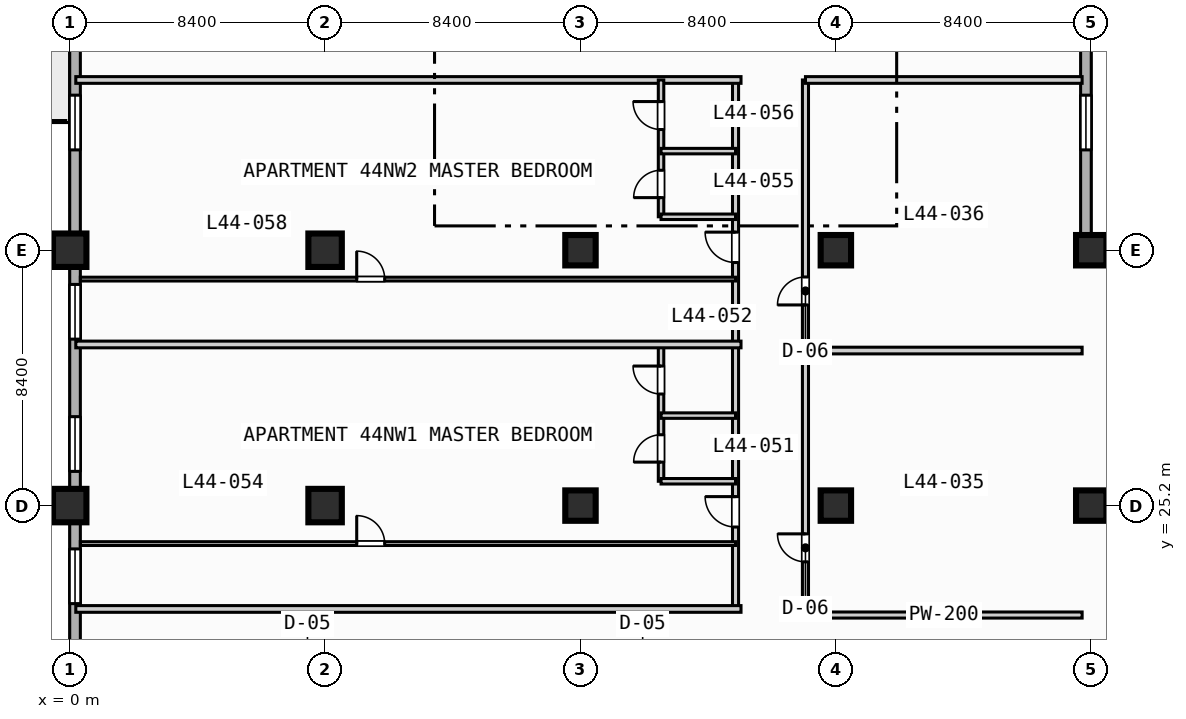
"""IFC4 building model, lengths in metres.
Left out: names, types, materials, properties, quantities, classifications, styles, units other than length and angle.
Written with IfcOpenShell. Run it as: python <this file> out.ifc"""

import sys

from ifc_helpers import new_model, si_unit, direction, frame, frame_2d, origin, origin_2d, place, context, subcontext, project, spatial, rectangle, extrude, element, fill, save


model = new_model("IFC4")
c1 = context("Model", 3, precision=1e-05, world=origin(), true_north=direction((0.0, 1.0)))
c2 = subcontext(c1, "Body", "Model", "MODEL_VIEW")
j1 = project(units=[si_unit("LENGTHUNIT", "METRE"), si_unit("PLANEANGLEUNIT", "RADIAN")], contexts=[c1])
p1 = place(None, origin())
s1 = spatial("IfcSite", under=j1, at=p1, CompositionType="ELEMENT")
p2 = place(p1, origin())
s2 = spatial("IfcBuilding", under=s1, at=p2, CompositionType="ELEMENT")
p3 = place(p2, frame((0.0, 0.0, 182.8)))
s3 = spatial("IfcBuildingStorey", under=s2, at=p3, CompositionType="ELEMENT", Elevation=182.8)
for number, where, z_axis, x_axis in (
    (1, (0.0, 25.2, 0.0), (0.0, 0.0, 1.0), (1.0, 0.0, 0.0)),
    (2, (0.0, 33.6, 0.0), (0.0, 0.0, 1.0), (1.0, 0.0, 0.0)),
    (3, (8.4, 25.2, 0.0), (0.0, 0.0, 1.0), (1.0, 0.0, 0.0)),
    (4, (8.4, 33.6, 0.0), (0.0, 0.0, 1.0), (1.0, 0.0, 0.0)),
):
    element("IfcColumn", number, at=place(p3, frame(where, z_axis=z_axis, x_axis=x_axis)), inside=s3, PredefinedType="COLUMN", context=c2, shape_type="SweptSolid", body=[
        extrude(rectangle(XDim=1.1, YDim=1.1, at=origin_2d()), origin(), (0.0, 0.0, 1.0), 3.7),
    ])
for number, where, z_axis, x_axis in (
    (5, (16.8, 25.2, 0.0), (0.0, 0.0, 1.0), (1.0, 0.0, 0.0)),
    (6, (16.8, 33.6, 0.0), (0.0, 0.0, 1.0), (1.0, 0.0, 0.0)),
    (7, (25.2, 25.2, 0.0), (0.0, 0.0, 1.0), (1.0, 0.0, 0.0)),
    (8, (25.2, 33.6, 0.0), (0.0, 0.0, 1.0), (1.0, 0.0, 0.0)),
    (9, (33.6, 25.2, 0.0), (0.0, 0.0, 1.0), (1.0, 0.0, 0.0)),
    (10, (33.6, 33.6, 0.0), (0.0, 0.0, 1.0), (1.0, 0.0, 0.0)),
):
    element("IfcColumn", number, at=place(p3, frame(where, z_axis=z_axis, x_axis=x_axis)), inside=s3, PredefinedType="COLUMN", context=c2, shape_type="SweptSolid", body=[
        extrude(rectangle(XDim=1.0, YDim=1.0, at=origin_2d()), origin(), (0.0, 0.0, 1.0), 3.7),
    ])
p4 = place(p3, frame((0.175, 3.175, 0.0), z_axis=(0.0, 0.0, 1.0), x_axis=(0.0, 1.0, 0.0)))
e11 = element("IfcWall", 11, at=p4, inside=s3, PredefinedType="STANDARD", context=c2, shape_type="SweptSolid", body=[
    extrude(rectangle(XDim=69.25, YDim=0.35, at=frame_2d((34.625, 0.0))), origin(), (0.0, 0.0, 1.0), 3.47),
])
p5 = place(p4, frame((42.325, 0.0, 0.0)))
e12 = element("IfcOpeningElement", 12, at=p5, cuts=e11, PredefinedType="OPENING", context=c2, shape_type="SweptSolid", body=[
    extrude(rectangle(XDim=1.4, YDim=2.2, at=frame_2d((0.7, 1.1))), frame((0.0, 0.185, 0.0), z_axis=(0.0, -1.0, 0.0), x_axis=(1.0, 0.0, 0.0)), (0.0, 0.0, 1.0), 0.37),
])
p6 = place(p4, frame((33.725, 0.0, 0.85)))
e13 = element("IfcOpeningElement", 13, at=p6, cuts=e11, PredefinedType="OPENING", context=c2, shape_type="SweptSolid", body=[
    extrude(rectangle(XDim=1.8, YDim=1.8, at=frame_2d((0.9, 0.9))), frame((0.0, 0.185, 0.0), z_axis=(0.0, -1.0, 0.0), x_axis=(1.0, 0.0, 0.0)), (0.0, 0.0, 1.0), 0.37),
])
p7 = place(p4, frame((18.8, 0.0, 0.85)))
e14 = element("IfcOpeningElement", 14, at=p7, cuts=e11, PredefinedType="OPENING", context=c2, shape_type="SweptSolid", body=[
    extrude(rectangle(XDim=1.8, YDim=1.8, at=frame_2d((0.9, 0.9))), frame((0.0, 0.185, 0.0), z_axis=(0.0, -1.0, 0.0), x_axis=(1.0, 0.0, 0.0)), (0.0, 0.0, 1.0), 0.37),
])
p8 = place(p4, frame((23.15, 0.0, 0.85)))
e15 = element("IfcOpeningElement", 15, at=p8, cuts=e11, PredefinedType="OPENING", context=c2, shape_type="SweptSolid", body=[
    extrude(rectangle(XDim=1.8, YDim=1.8, at=frame_2d((0.9, 0.9))), frame((0.0, 0.185, 0.0), z_axis=(0.0, -1.0, 0.0), x_axis=(1.0, 0.0, 0.0)), (0.0, 0.0, 1.0), 0.37),
])
p9 = place(p4, frame((27.5, 0.0, 0.85)))
e16 = element("IfcOpeningElement", 16, at=p9, cuts=e11, PredefinedType="OPENING", context=c2, shape_type="SweptSolid", body=[
    extrude(rectangle(XDim=1.8, YDim=1.8, at=frame_2d((0.9, 0.9))), frame((0.0, 0.185, 0.0), z_axis=(0.0, -1.0, 0.0), x_axis=(1.0, 0.0, 0.0)), (0.0, 0.0, 1.0), 0.37),
])
p10 = place(p3, frame((33.425, 72.425, 0.0), z_axis=(0.0, 0.0, 1.0), x_axis=(0.0, -1.0, 0.0)))
e17 = element("IfcWall", 17, at=p10, inside=s3, PredefinedType="STANDARD", context=c2, shape_type="SweptSolid", body=[
    extrude(rectangle(XDim=39.0, YDim=0.35, at=frame_2d((19.5, 0.0))), origin(), (0.0, 0.0, 1.0), 3.47),
])
p11 = place(p10, frame((33.725, 0.0, 0.85)))
e18 = element("IfcOpeningElement", 18, at=p11, cuts=e17, PredefinedType="OPENING", context=c2, shape_type="SweptSolid", body=[
    extrude(rectangle(XDim=1.8, YDim=1.8, at=frame_2d((0.9, 0.9))), frame((0.0, 0.185, 0.0), z_axis=(0.0, -1.0, 0.0), x_axis=(1.0, 0.0, 0.0)), (0.0, 0.0, 1.0), 0.37),
])
p12 = place(p10, frame((16.925, 0.0, 0.85)))
e19 = element("IfcOpeningElement", 19, at=p12, cuts=e17, PredefinedType="OPENING", context=c2, shape_type="SweptSolid", body=[
    extrude(rectangle(XDim=1.8, YDim=1.8, at=frame_2d((0.9, 0.9))), frame((0.0, 0.185, 0.0), z_axis=(0.0, -1.0, 0.0), x_axis=(1.0, 0.0, 0.0)), (0.0, 0.0, 1.0), 0.37),
])
p13 = place(p10, frame((8.225, 0.0, 0.85)))
e20 = element("IfcOpeningElement", 20, at=p13, cuts=e17, PredefinedType="OPENING", context=c2, shape_type="SweptSolid", body=[
    extrude(rectangle(XDim=2.4, YDim=1.95, at=frame_2d((1.2, 0.975))), frame((0.0, 0.185, 0.0), z_axis=(0.0, -1.0, 0.0), x_axis=(1.0, 0.0, 0.0)), (0.0, 0.0, 1.0), 0.37),
])
p14 = place(p3, frame((33.425, 33.425, 0.0), z_axis=(0.0, 0.0, 1.0), x_axis=(1.0, 0.0, 0.0)))
e21 = element("IfcWall", 21, at=p14, inside=s3, PredefinedType="STANDARD", context=c2, shape_type="SweptSolid", body=[
    extrude(rectangle(XDim=39.0, YDim=0.35, at=frame_2d((19.5, 0.0))), origin(), (0.0, 0.0, 1.0), 3.47),
])
p15 = place(p14, frame((12.075, 0.0, 0.0)))
e22 = element("IfcOpeningElement", 22, at=p15, cuts=e21, PredefinedType="OPENING", context=c2, shape_type="SweptSolid", body=[
    extrude(rectangle(XDim=1.4, YDim=2.2, at=frame_2d((0.7, 1.1))), frame((0.0, 0.185, 0.0), z_axis=(0.0, -1.0, 0.0), x_axis=(1.0, 0.0, 0.0)), (0.0, 0.0, 1.0), 0.37),
])
p16 = place(p14, frame((20.275, 0.0, 0.85)))
e23 = element("IfcOpeningElement", 23, at=p16, cuts=e21, PredefinedType="OPENING", context=c2, shape_type="SweptSolid", body=[
    extrude(rectangle(XDim=1.8, YDim=1.8, at=frame_2d((0.9, 0.9))), frame((0.0, 0.185, 0.0), z_axis=(0.0, -1.0, 0.0), x_axis=(1.0, 0.0, 0.0)), (0.0, 0.0, 1.0), 0.37),
])
p17 = place(p14, frame((28.375, 0.0, 0.85)))
e24 = element("IfcOpeningElement", 24, at=p17, cuts=e21, PredefinedType="OPENING", context=c2, shape_type="SweptSolid", body=[
    extrude(rectangle(XDim=2.4, YDim=1.95, at=frame_2d((1.2, 0.975))), frame((0.0, 0.185, 0.0), z_axis=(0.0, -1.0, 0.0), x_axis=(1.0, 0.0, 0.0)), (0.0, 0.0, 1.0), 0.37),
])
p18 = place(p3, frame((24.2, 21.6, 0.0), z_axis=(0.0, 0.0, 1.0), x_axis=(0.0, 1.0, 0.0)))
e25 = element("IfcWall", 25, at=p18, inside=s3, PredefinedType="PARTITIONING", context=c2, shape_type="SweptSolid", body=[
    extrude(rectangle(XDim=17.6, YDim=0.2, at=frame_2d((8.8, 0.0))), origin(), (0.0, 0.0, 1.0), 3.47),
])
p19 = place(p18, frame((1.75, 0.0, 0.0)))
e26 = element("IfcOpeningElement", 26, at=p19, cuts=e25, PredefinedType="OPENING", context=c2, shape_type="SweptSolid", body=[
    extrude(rectangle(XDim=0.92, YDim=2.1, at=frame_2d((0.46, 1.05))), frame((0.0, 0.11, 0.0), z_axis=(0.0, -1.0, 0.0), x_axis=(1.0, 0.0, 0.0)), (0.0, 0.0, 1.0), 0.22),
])
p20 = place(p18, frame((10.2, 0.0, 0.0)))
e27 = element("IfcOpeningElement", 27, at=p20, cuts=e25, PredefinedType="OPENING", context=c2, shape_type="SweptSolid", body=[
    extrude(rectangle(XDim=0.92, YDim=2.1, at=frame_2d((0.46, 1.05))), frame((0.0, 0.11, 0.0), z_axis=(0.0, -1.0, 0.0), x_axis=(1.0, 0.0, 0.0)), (0.0, 0.0, 1.0), 0.22),
])
p21 = place(p3, frame((24.2, 21.6, 0.0), z_axis=(0.0, 0.0, 1.0), x_axis=(1.0, 0.0, 0.0)))
e28 = element("IfcWall", 28, at=p21, inside=s3, PredefinedType="PARTITIONING", context=c2, shape_type="SweptSolid", body=[
    extrude(rectangle(XDim=9.1, YDim=0.2, at=frame_2d((4.55, 0.0))), origin(), (0.0, 0.0, 1.0), 3.47),
])
for number, where, z_axis, x_axis in (
    (29, (24.2, 30.3, 0.0), (0.0, 0.0, 1.0), (1.0, 0.0, 0.0)),
    (30, (24.2, 39.2, 0.0), (0.0, 0.0, 1.0), (1.0, 0.0, 0.0)),
):
    element("IfcWall", number, at=place(p3, frame(where, z_axis=z_axis, x_axis=x_axis)), inside=s3, PredefinedType="PARTITIONING", context=c2, shape_type="SweptSolid", body=[
        extrude(rectangle(XDim=9.1, YDim=0.22, at=frame_2d((4.55, 0.0))), origin(), (0.0, 0.0, 1.0), 3.47),
    ])
p22 = place(p3, frame((21.9, 21.8, 0.0), z_axis=(0.0, 0.0, 1.0), x_axis=(0.0, 1.0, 0.0)))
e31 = element("IfcWall", 31, at=p22, inside=s3, PredefinedType="PARTITIONING", context=c2, shape_type="SweptSolid", body=[
    extrude(rectangle(XDim=17.4, YDim=0.2, at=frame_2d((8.7, 0.0))), origin(), (0.0, 0.0, 1.0), 3.47),
])
p23 = place(p22, frame((2.695, 0.0, 0.0)))
e32 = element("IfcOpeningElement", 32, at=p23, cuts=e31, PredefinedType="OPENING", context=c2, shape_type="SweptSolid", body=[
    extrude(rectangle(XDim=1.0, YDim=2.15, at=frame_2d((0.5, 1.075))), frame((0.0, 0.11, 0.0), z_axis=(0.0, -1.0, 0.0), x_axis=(1.0, 0.0, 0.0)), (0.0, 0.0, 1.0), 0.22),
])
p24 = place(p22, frame((11.395, 0.0, 0.0)))
e33 = element("IfcOpeningElement", 33, at=p24, cuts=e31, PredefinedType="OPENING", context=c2, shape_type="SweptSolid", body=[
    extrude(rectangle(XDim=1.0, YDim=2.15, at=frame_2d((0.5, 1.075))), frame((0.0, 0.11, 0.0), z_axis=(0.0, -1.0, 0.0), x_axis=(1.0, 0.0, 0.0)), (0.0, 0.0, 1.0), 0.22),
])
p25 = place(p3, frame((0.2, 21.8, 0.0), z_axis=(0.0, 0.0, 1.0), x_axis=(1.0, 0.0, 0.0)))
e34 = element("IfcWall", 34, at=p25, inside=s3, PredefinedType="PARTITIONING", context=c2, shape_type="SweptSolid", body=[
    extrude(rectangle(XDim=21.88, YDim=0.22, at=frame_2d((10.94, 0.0))), origin(), (0.0, 0.0, 1.0), 3.47),
])
p26 = place(p3, frame((19.45, 26.0, 0.0), z_axis=(0.0, 0.0, 1.0), x_axis=(0.0, 1.0, 0.0)))
e35 = element("IfcWall", 35, at=p26, inside=s3, PredefinedType="PLUMBINGWALL", context=c2, shape_type="SweptSolid", body=[
    extrude(rectangle(XDim=4.5, YDim=0.18, at=frame_2d((2.25, 0.0))), origin(), (0.0, 0.0, 1.0), 3.47),
])
p27 = place(p26, frame((0.63, 0.0, 0.0)))
e36 = element("IfcOpeningElement", 36, at=p27, cuts=e35, PredefinedType="OPENING", context=c2, shape_type="SweptSolid", body=[
    extrude(rectangle(XDim=0.9, YDim=2.1, at=frame_2d((0.45, 1.05))), frame((0.0, 0.1, 0.0), z_axis=(0.0, -1.0, 0.0), x_axis=(1.0, 0.0, 0.0)), (0.0, 0.0, 1.0), 0.2),
])
p28 = place(p26, frame((2.87, 0.0, 0.0)))
e37 = element("IfcOpeningElement", 37, at=p28, cuts=e35, PredefinedType="OPENING", context=c2, shape_type="SweptSolid", body=[
    extrude(rectangle(XDim=0.92, YDim=2.1, at=frame_2d((0.46, 1.05))), frame((0.0, 0.1, 0.0), z_axis=(0.0, -1.0, 0.0), x_axis=(1.0, 0.0, 0.0)), (0.0, 0.0, 1.0), 0.2),
])
for number, where, z_axis, x_axis in (
    (38, (19.45, 26.0, 0.0), (0.0, 0.0, 1.0), (1.0, 0.0, 0.0)),
    (39, (19.45, 28.16, 0.0), (0.0, 0.0, 1.0), (1.0, 0.0, 0.0)),
):
    element("IfcWall", number, at=place(p3, frame(where, z_axis=z_axis, x_axis=x_axis)), inside=s3, PredefinedType="PLUMBINGWALL", context=c2, shape_type="SweptSolid", body=[
        extrude(rectangle(XDim=2.45, YDim=0.18, at=frame_2d((1.225, 0.0))), origin(), (0.0, 0.0, 1.0), 3.47),
    ])
p29 = place(p3, frame((0.35, 23.95, 0.0), z_axis=(0.0, 0.0, 1.0), x_axis=(1.0, 0.0, 0.0)))
e40 = element("IfcWall", 40, at=p29, inside=s3, PredefinedType="PARTITIONING", context=c2, shape_type="SweptSolid", body=[
    extrude(rectangle(XDim=21.55, YDim=0.125, at=frame_2d((10.775, 0.0))), origin(), (0.0, 0.0, 1.0), 3.47),
])
p30 = place(p29, frame((9.09, 0.0, 0.0)))
e41 = element("IfcOpeningElement", 41, at=p30, cuts=e40, PredefinedType="OPENING", context=c2, shape_type="SweptSolid", body=[
    extrude(rectangle(XDim=0.92, YDim=2.1, at=frame_2d((0.46, 1.05))), frame((0.0, 0.073, 0.0), z_axis=(0.0, -1.0, 0.0), x_axis=(1.0, 0.0, 0.0)), (0.0, 0.0, 1.0), 0.145),
])
for number, where, z_axis, x_axis in (
    (42, (0.2, 30.5, 0.0), (0.0, 0.0, 1.0), (1.0, 0.0, 0.0)),
    (43, (0.2, 39.2, 0.0), (0.0, 0.0, 1.0), (1.0, 0.0, 0.0)),
):
    element("IfcWall", number, at=place(p3, frame(where, z_axis=z_axis, x_axis=x_axis)), inside=s3, PredefinedType="PARTITIONING", context=c2, shape_type="SweptSolid", body=[
        extrude(rectangle(XDim=21.88, YDim=0.22, at=frame_2d((10.94, 0.0))), origin(), (0.0, 0.0, 1.0), 3.47),
    ])
p31 = place(p3, frame((19.45, 34.7, 0.0), z_axis=(0.0, 0.0, 1.0), x_axis=(0.0, 1.0, 0.0)))
e44 = element("IfcWall", 44, at=p31, inside=s3, PredefinedType="PLUMBINGWALL", context=c2, shape_type="SweptSolid", body=[
    extrude(rectangle(XDim=4.5, YDim=0.18, at=frame_2d((2.25, 0.0))), origin(), (0.0, 0.0, 1.0), 3.47),
])
p32 = place(p31, frame((0.63, 0.0, 0.0)))
e45 = element("IfcOpeningElement", 45, at=p32, cuts=e44, PredefinedType="OPENING", context=c2, shape_type="SweptSolid", body=[
    extrude(rectangle(XDim=0.9, YDim=2.1, at=frame_2d((0.45, 1.05))), frame((0.0, 0.1, 0.0), z_axis=(0.0, -1.0, 0.0), x_axis=(1.0, 0.0, 0.0)), (0.0, 0.0, 1.0), 0.2),
])
p33 = place(p31, frame((2.87, 0.0, 0.0)))
e46 = element("IfcOpeningElement", 46, at=p33, cuts=e44, PredefinedType="OPENING", context=c2, shape_type="SweptSolid", body=[
    extrude(rectangle(XDim=0.92, YDim=2.1, at=frame_2d((0.46, 1.05))), frame((0.0, 0.1, 0.0), z_axis=(0.0, -1.0, 0.0), x_axis=(1.0, 0.0, 0.0)), (0.0, 0.0, 1.0), 0.2),
])
for number, where, z_axis, x_axis in (
    (47, (19.45, 34.7, 0.0), (0.0, 0.0, 1.0), (1.0, 0.0, 0.0)),
    (48, (19.45, 36.86, 0.0), (0.0, 0.0, 1.0), (1.0, 0.0, 0.0)),
):
    element("IfcWall", number, at=place(p3, frame(where, z_axis=z_axis, x_axis=x_axis)), inside=s3, PredefinedType="PLUMBINGWALL", context=c2, shape_type="SweptSolid", body=[
        extrude(rectangle(XDim=2.45, YDim=0.18, at=frame_2d((1.225, 0.0))), origin(), (0.0, 0.0, 1.0), 3.47),
    ])
p34 = place(p3, frame((0.35, 32.65, 0.0), z_axis=(0.0, 0.0, 1.0), x_axis=(1.0, 0.0, 0.0)))
e49 = element("IfcWall", 49, at=p34, inside=s3, PredefinedType="PARTITIONING", context=c2, shape_type="SweptSolid", body=[
    extrude(rectangle(XDim=21.55, YDim=0.125, at=frame_2d((10.775, 0.0))), origin(), (0.0, 0.0, 1.0), 3.47),
])
p35 = place(p34, frame((9.09, 0.0, 0.0)))
e50 = element("IfcOpeningElement", 50, at=p35, cuts=e49, PredefinedType="OPENING", context=c2, shape_type="SweptSolid", body=[
    extrude(rectangle(XDim=0.92, YDim=2.1, at=frame_2d((0.46, 1.05))), frame((0.0, 0.073, 0.0), z_axis=(0.0, -1.0, 0.0), x_axis=(1.0, 0.0, 0.0)), (0.0, 0.0, 1.0), 0.145),
])
p36 = place(p6, origin())
e51 = element("IfcWindow", 51, at=p36, inside=s3, PartitioningType="SINGLE_PANEL", PredefinedType="WINDOW", context=c2, shape_type="SweptSolid", body=[
    extrude(rectangle(XDim=1.8, YDim=1.8, at=frame_2d((0.9, 0.9))), frame((0.0, 0.03, 0.0), z_axis=(0.0, -1.0, 0.0), x_axis=(1.0, 0.0, 0.0)), (0.0, 0.0, 1.0), 0.06),
])
fill(e13, e51)
p37 = place(p7, origin())
e52 = element("IfcWindow", 52, at=p37, inside=s3, PartitioningType="SINGLE_PANEL", PredefinedType="WINDOW", context=c2, shape_type="SweptSolid", body=[
    extrude(rectangle(XDim=1.8, YDim=1.8, at=frame_2d((0.9, 0.9))), frame((0.0, 0.03, 0.0), z_axis=(0.0, -1.0, 0.0), x_axis=(1.0, 0.0, 0.0)), (0.0, 0.0, 1.0), 0.06),
])
fill(e14, e52)
p38 = place(p8, origin())
e53 = element("IfcWindow", 53, at=p38, inside=s3, PartitioningType="SINGLE_PANEL", PredefinedType="WINDOW", context=c2, shape_type="SweptSolid", body=[
    extrude(rectangle(XDim=1.8, YDim=1.8, at=frame_2d((0.9, 0.9))), frame((0.0, 0.03, 0.0), z_axis=(0.0, -1.0, 0.0), x_axis=(1.0, 0.0, 0.0)), (0.0, 0.0, 1.0), 0.06),
])
fill(e15, e53)
p39 = place(p9, origin())
e54 = element("IfcWindow", 54, at=p39, inside=s3, PartitioningType="SINGLE_PANEL", PredefinedType="WINDOW", context=c2, shape_type="SweptSolid", body=[
    extrude(rectangle(XDim=1.8, YDim=1.8, at=frame_2d((0.9, 0.9))), frame((0.0, 0.03, 0.0), z_axis=(0.0, -1.0, 0.0), x_axis=(1.0, 0.0, 0.0)), (0.0, 0.0, 1.0), 0.06),
])
fill(e16, e54)
p40 = place(p11, origin())
e55 = element("IfcWindow", 55, at=p40, inside=s3, PartitioningType="SINGLE_PANEL", PredefinedType="WINDOW", context=c2, shape_type="SweptSolid", body=[
    extrude(rectangle(XDim=1.8, YDim=1.8, at=frame_2d((0.9, 0.9))), frame((0.0, 0.03, 0.0), z_axis=(0.0, -1.0, 0.0), x_axis=(1.0, 0.0, 0.0)), (0.0, 0.0, 1.0), 0.06),
])
fill(e18, e55)
p41 = place(p19, origin())
e56 = element("IfcDoor", 56, at=p41, inside=s3, OperationType="SINGLE_SWING_RIGHT", PredefinedType="DOOR", context=c2, shape_type="SweptSolid", body=[
    extrude(rectangle(XDim=0.92, YDim=2.1, at=frame_2d((0.46, 1.05))), frame((0.0, 0.025, 0.0), z_axis=(0.0, -1.0, 0.0), x_axis=(1.0, 0.0, 0.0)), (0.0, 0.0, 1.0), 0.05),
])
fill(e26, e56)
p42 = place(p20, origin())
e57 = element("IfcDoor", 57, at=p42, inside=s3, OperationType="SINGLE_SWING_LEFT", PredefinedType="DOOR", context=c2, shape_type="SweptSolid", body=[
    extrude(rectangle(XDim=0.92, YDim=2.1, at=frame_2d((0.46, 1.05))), frame((0.0, 0.025, 0.0), z_axis=(0.0, -1.0, 0.0), x_axis=(1.0, 0.0, 0.0)), (0.0, 0.0, 1.0), 0.05),
])
fill(e27, e57)
p43 = place(p23, origin())
e58 = element("IfcDoor", 58, at=p43, inside=s3, OperationType="SINGLE_SWING_RIGHT", PredefinedType="DOOR", context=c2, shape_type="SweptSolid", body=[
    extrude(rectangle(XDim=1.0, YDim=2.15, at=frame_2d((0.5, 1.075))), frame((0.0, 0.025, 0.0), z_axis=(0.0, -1.0, 0.0), x_axis=(1.0, 0.0, 0.0)), (0.0, 0.0, 1.0), 0.05),
])
fill(e32, e58)
p44 = place(p24, origin())
e59 = element("IfcDoor", 59, at=p44, inside=s3, OperationType="SINGLE_SWING_RIGHT", PredefinedType="DOOR", context=c2, shape_type="SweptSolid", body=[
    extrude(rectangle(XDim=1.0, YDim=2.15, at=frame_2d((0.5, 1.075))), frame((0.0, 0.025, 0.0), z_axis=(0.0, -1.0, 0.0), x_axis=(1.0, 0.0, 0.0)), (0.0, 0.0, 1.0), 0.05),
])
fill(e33, e59)
p45 = place(p27, origin())
e60 = element("IfcDoor", 60, at=p45, inside=s3, OperationType="SINGLE_SWING_LEFT", PredefinedType="DOOR", context=c2, shape_type="SweptSolid", body=[
    extrude(rectangle(XDim=0.9, YDim=2.1, at=frame_2d((0.45, 1.05))), frame((0.0, 0.025, 0.0), z_axis=(0.0, -1.0, 0.0), x_axis=(1.0, 0.0, 0.0)), (0.0, 0.0, 1.0), 0.05),
])
fill(e36, e60)
p46 = place(p28, origin())
e61 = element("IfcDoor", 61, at=p46, inside=s3, OperationType="SINGLE_SWING_RIGHT", PredefinedType="DOOR", context=c2, shape_type="SweptSolid", body=[
    extrude(rectangle(XDim=0.92, YDim=2.1, at=frame_2d((0.46, 1.05))), frame((0.0, 0.025, 0.0), z_axis=(0.0, -1.0, 0.0), x_axis=(1.0, 0.0, 0.0)), (0.0, 0.0, 1.0), 0.05),
])
fill(e37, e61)
p47 = place(p30, origin())
e62 = element("IfcDoor", 62, at=p47, inside=s3, OperationType="SINGLE_SWING_LEFT", PredefinedType="DOOR", context=c2, shape_type="SweptSolid", body=[
    extrude(rectangle(XDim=0.92, YDim=2.1, at=frame_2d((0.46, 1.05))), frame((0.0, 0.025, 0.0), z_axis=(0.0, -1.0, 0.0), x_axis=(1.0, 0.0, 0.0)), (0.0, 0.0, 1.0), 0.05),
])
fill(e41, e62)
p48 = place(p32, origin())
e63 = element("IfcDoor", 63, at=p48, inside=s3, OperationType="SINGLE_SWING_LEFT", PredefinedType="DOOR", context=c2, shape_type="SweptSolid", body=[
    extrude(rectangle(XDim=0.9, YDim=2.1, at=frame_2d((0.45, 1.05))), frame((0.0, 0.025, 0.0), z_axis=(0.0, -1.0, 0.0), x_axis=(1.0, 0.0, 0.0)), (0.0, 0.0, 1.0), 0.05),
])
fill(e45, e63)
p49 = place(p33, origin())
e64 = element("IfcDoor", 64, at=p49, inside=s3, OperationType="SINGLE_SWING_RIGHT", PredefinedType="DOOR", context=c2, shape_type="SweptSolid", body=[
    extrude(rectangle(XDim=0.92, YDim=2.1, at=frame_2d((0.46, 1.05))), frame((0.0, 0.025, 0.0), z_axis=(0.0, -1.0, 0.0), x_axis=(1.0, 0.0, 0.0)), (0.0, 0.0, 1.0), 0.05),
])
fill(e46, e64)
p50 = place(p35, origin())
e65 = element("IfcDoor", 65, at=p50, inside=s3, OperationType="SINGLE_SWING_LEFT", PredefinedType="DOOR", context=c2, shape_type="SweptSolid", body=[
    extrude(rectangle(XDim=0.92, YDim=2.1, at=frame_2d((0.46, 1.05))), frame((0.0, 0.025, 0.0), z_axis=(0.0, -1.0, 0.0), x_axis=(1.0, 0.0, 0.0)), (0.0, 0.0, 1.0), 0.05),
])
fill(e50, e65)
save(model, sys.argv[1])
